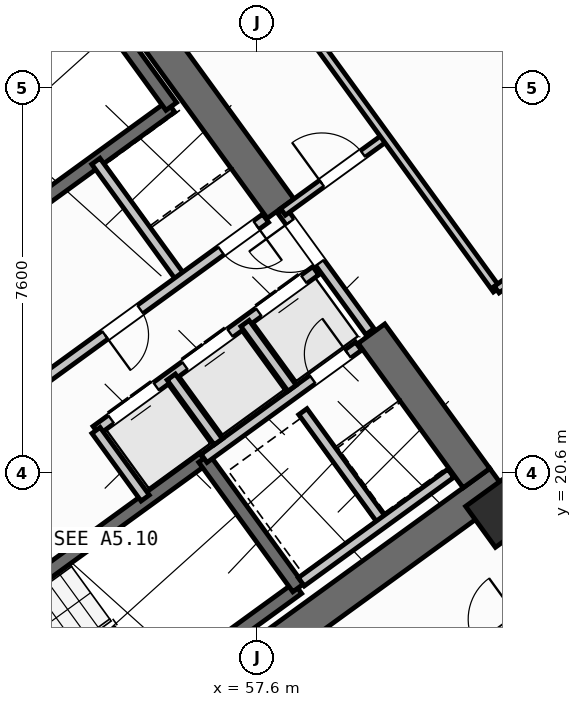
"""IFC4 building model, lengths in metres.
Left out: names, types, materials, properties, quantities, classifications, styles, units other than length and angle.
Written with IfcOpenShell. Run it as: python <this file> out.ifc"""

import sys

from ifc_helpers import new_model, si_unit, direction, frame, frame_2d, origin, origin_2d, place, context, subcontext, project, spatial, rectangle, hollow_rectangle, extrude, source, transform, mapped, element, fill, save


model = new_model("IFC4")
c1 = context("Model", 3, precision=1e-05, world=origin(), true_north=direction((0.0, 1.0)))
c2 = subcontext(c1, "Body", "Model", "MODEL_VIEW")
j1 = project(units=[si_unit("LENGTHUNIT", "METRE"), si_unit("PLANEANGLEUNIT", "RADIAN")], contexts=[c1])
p1 = place(None, origin())
s1 = spatial("IfcSite", under=j1, at=p1, CompositionType="ELEMENT")
p2 = place(p1, origin())
s2 = spatial("IfcBuilding", under=s1, at=p2, CompositionType="ELEMENT")
p3 = place(p2, frame((0.0, 0.0, 52.8)))
s3 = spatial("IfcBuildingStorey", under=s2, at=p3, CompositionType="ELEMENT", Elevation=52.8)
p4 = place(p3, frame((52.318, 13.11, 0.0), z_axis=(0.0, 0.0, 1.0), x_axis=(0.809019445368, 0.587781878776, 0.0)))
e1 = element("IfcWall", 1, at=p4, inside=s3, PredefinedType="SHEAR", context=c2, shape_type="SweptSolid", body=[
    extrude(rectangle(XDim=12.44, YDim=0.65, at=frame_2d((6.22, 0.0))), origin(), (0.0, 0.0, 1.0), 3.35),
])
p5 = place(p3, frame((44.325, 24.113, 0.0), z_axis=(0.0, 0.0, 1.0), x_axis=(0.809012664862, 0.58779121131, 0.0)))
e2 = element("IfcWall", 2, at=p5, inside=s3, PredefinedType="SHEAR", context=c2, shape_type="SweptSolid", body=[
    extrude(rectangle(XDim=12.44, YDim=0.65, at=frame_2d((6.22, 0.0))), origin(), (0.0, 0.0, 1.0), 3.35),
])
p6 = place(p3, frame((61.929, 20.494, 0.0), z_axis=(0.0, 0.0, 1.0), x_axis=(-0.58782982593, 0.808984607855, 0.0)))
e3 = element("IfcWall", 3, at=p6, inside=s3, PredefinedType="SHEAR", context=c2, shape_type="SweptSolid", body=[
    extrude(rectangle(XDim=3.525, YDim=0.65, at=frame_2d((1.762, 0.0))), origin(), (0.0, 0.0, 1.0), 3.35),
])
p7 = place(p3, frame((58.064, 25.813, 0.0), z_axis=(0.0, 0.0, 1.0), x_axis=(-0.58777996584, 0.809020835181, 0.0)))
e4 = element("IfcWall", 4, at=p7, inside=s3, PredefinedType="SHEAR", context=c2, shape_type="SweptSolid", body=[
    extrude(rectangle(XDim=6.375, YDim=0.65, at=frame_2d((3.188, 0.0))), origin(), (0.0, 0.0, 1.0), 3.35),
])
m1 = source(origin(), c2, "Body", "SweptSolid", [
    extrude(hollow_rectangle(XDim=1.0, YDim=1.0, WallThickness=0.04, at=origin_2d()), origin(), (0.0, 0.0, 1.0), 3.6),
])
for number, where, z_axis, x_axis in (
    (5, (62.414, 19.827, 0.0), (0.0, 0.0, 1.0), (0.809, 0.588, 0.0)),
    (6, (62.977, 29.259, 0.0), (0.0, 0.0, 1.0), (0.809, 0.588, 0.0)),
):
    element("IfcColumn", number, at=place(p3, frame(where, z_axis=z_axis, x_axis=x_axis)), inside=s3, PredefinedType="COLUMN", context=c2, shape_type="MappedRepresentation", body=[
        mapped(m1, transform((0.0, 0.0, 0.0), scale=1.0)),
    ])
p8 = place(p3, frame((43.938, 25.192, 0.0), z_axis=(0.0, 0.0, 1.0), x_axis=(0.809016324578, 0.587786174187, 0.0)))
e7 = element("IfcWall", 7, at=p8, inside=s3, PredefinedType="STANDARD", context=c2, shape_type="SweptSolid", body=[
    extrude(rectangle(XDim=17.587, YDim=0.32, at=frame_2d((8.794, 0.0))), origin(), (0.0, 0.0, 1.0), 3.35),
])
p9 = place(p8, frame((14.914, 0.0, 0.0)))
e8 = element("IfcOpeningElement", 8, at=p9, cuts=e7, PredefinedType="OPENING", context=c2, shape_type="SweptSolid", body=[
    extrude(rectangle(XDim=1.05, YDim=2.15, at=frame_2d((0.525, 1.075))), frame((0.0, 0.17, 0.0), z_axis=(0.0, -1.0, 0.0), x_axis=(1.0, 0.0, 0.0)), (0.0, 0.0, 1.0), 0.34),
])
p10 = place(p8, frame((2.169, 0.0, 0.8)))
e9 = element("IfcOpeningElement", 9, at=p10, cuts=e7, PredefinedType="OPENING", context=c2, shape_type="SweptSolid", body=[
    extrude(rectangle(XDim=2.1, YDim=1.55, at=frame_2d((1.05, 0.775))), frame((0.0, 0.17, 0.0), z_axis=(0.0, -1.0, 0.0), x_axis=(1.0, 0.0, 0.0)), (0.0, 0.0, 1.0), 0.34),
])
p11 = place(p8, frame((7.319, 0.0, 0.8)))
e10 = element("IfcOpeningElement", 10, at=p11, cuts=e7, PredefinedType="OPENING", context=c2, shape_type="SweptSolid", body=[
    extrude(rectangle(XDim=2.1, YDim=1.55, at=frame_2d((1.05, 0.775))), frame((0.0, 0.17, 0.0), z_axis=(0.0, -1.0, 0.0), x_axis=(1.0, 0.0, 0.0)), (0.0, 0.0, 1.0), 0.34),
])
p12 = place(p3, frame((58.455, 35.484, 0.0), z_axis=(0.0, 0.0, 1.0), x_axis=(0.587783625747, -0.809018176127, 0.0)))
e11 = element("IfcWall", 11, at=p12, inside=s3, PredefinedType="STANDARD", context=c2, shape_type="SweptSolid", body=[
    extrude(rectangle(XDim=21.587, YDim=0.32, at=frame_2d((10.794, 0.0))), origin(), (0.0, 0.0, 1.0), 2.725),
])
p13 = place(p12, frame((1.5, 0.0, 0.8)))
e12 = element("IfcOpeningElement", 12, at=p13, cuts=e11, PredefinedType="OPENING", context=c2, shape_type="SweptSolid", body=[
    extrude(rectangle(XDim=2.1, YDim=1.55, at=frame_2d((1.05, 0.775))), frame((0.0, 0.17, 0.0), z_axis=(0.0, -1.0, 0.0), x_axis=(1.0, 0.0, 0.0)), (0.0, 0.0, 1.0), 0.34),
])
p14 = place(p12, frame((5.105, 0.0, 0.85)))
e13 = element("IfcOpeningElement", 13, at=p14, cuts=e11, PredefinedType="OPENING", context=c2, shape_type="SweptSolid", body=[
    extrude(rectangle(XDim=1.5, YDim=1.5, at=frame_2d((0.75, 0.75))), frame((0.0, 0.17, 0.0), z_axis=(0.0, -1.0, 0.0), x_axis=(1.0, 0.0, 0.0)), (0.0, 0.0, 1.0), 0.34),
])
p15 = place(p12, frame((8.954, 0.0, 0.85)))
e14 = element("IfcOpeningElement", 14, at=p15, cuts=e11, PredefinedType="OPENING", context=c2, shape_type="SweptSolid", body=[
    extrude(rectangle(XDim=1.5, YDim=1.5, at=frame_2d((0.75, 0.75))), frame((0.0, 0.17, 0.0), z_axis=(0.0, -1.0, 0.0), x_axis=(1.0, 0.0, 0.0)), (0.0, 0.0, 1.0), 0.34),
])
p16 = place(p12, frame((17.581, 0.0, 0.95)))
e15 = element("IfcOpeningElement", 15, at=p16, cuts=e11, PredefinedType="OPENING", context=c2, shape_type="SweptSolid", body=[
    extrude(rectangle(XDim=1.2, YDim=1.4, at=frame_2d((0.6, 0.7))), frame((0.0, 0.17, 0.0), z_axis=(0.0, -1.0, 0.0), x_axis=(1.0, 0.0, 0.0)), (0.0, 0.0, 1.0), 0.34),
])
p17 = place(p3, frame((71.098, 17.731, 0.0), z_axis=(0.0, 0.0, 1.0), x_axis=(-0.809021120468, -0.587779573171, 0.0)))
e16 = element("IfcWall", 16, at=p17, inside=s3, PredefinedType="STANDARD", context=c2, shape_type="SweptSolid", body=[
    extrude(rectangle(XDim=17.588, YDim=0.32, at=frame_2d((8.794, 0.0))), origin(), (0.0, 0.0, 1.0), 3.35),
])
p18 = place(p17, frame((1.624, 0.0, 0.0)))
e17 = element("IfcOpeningElement", 17, at=p18, cuts=e16, PredefinedType="OPENING", context=c2, shape_type="SweptSolid", body=[
    extrude(rectangle(XDim=1.05, YDim=2.15, at=frame_2d((0.525, 1.075))), frame((0.0, 0.17, 0.0), z_axis=(0.0, -1.0, 0.0), x_axis=(1.0, 0.0, 0.0)), (0.0, 0.0, 1.0), 0.34),
])
p19 = place(p17, frame((4.104, 0.0, 1.0)))
e18 = element("IfcOpeningElement", 18, at=p19, cuts=e16, PredefinedType="OPENING", context=c2, shape_type="SweptSolid", body=[
    extrude(rectangle(XDim=0.9, YDim=1.25, at=frame_2d((0.45, 0.625))), frame((0.0, 0.17, 0.0), z_axis=(0.0, -1.0, 0.0), x_axis=(1.0, 0.0, 0.0)), (0.0, 0.0, 1.0), 0.34),
])
p20 = place(p17, frame((7.879, 0.0, 0.85)))
e19 = element("IfcOpeningElement", 19, at=p20, cuts=e16, PredefinedType="OPENING", context=c2, shape_type="SweptSolid", body=[
    extrude(rectangle(XDim=1.8, YDim=1.5, at=frame_2d((0.9, 0.75))), frame((0.0, 0.17, 0.0), z_axis=(0.0, -1.0, 0.0), x_axis=(1.0, 0.0, 0.0)), (0.0, 0.0, 1.0), 0.34),
])
p21 = place(p17, frame((12.849, 0.0, 0.85)))
e20 = element("IfcOpeningElement", 20, at=p21, cuts=e16, PredefinedType="OPENING", context=c2, shape_type="SweptSolid", body=[
    extrude(rectangle(XDim=1.8, YDim=1.5, at=frame_2d((0.9, 0.75))), frame((0.0, 0.17, 0.0), z_axis=(0.0, -1.0, 0.0), x_axis=(1.0, 0.0, 0.0)), (0.0, 0.0, 1.0), 0.34),
])
p22 = place(p3, frame((48.006, 25.996, 0.0), z_axis=(0.0, 0.0, 1.0), x_axis=(0.80901903764, 0.587782439969, 0.0)))
e21 = element("IfcWall", 21, at=p22, inside=s3, PredefinedType="SHEAR", context=c2, shape_type="SweptSolid", body=[
    extrude(rectangle(XDim=7.46, YDim=0.26, at=frame_2d((3.73, 0.0))), origin(), (0.0, 0.0, 1.0), 3.35),
])
p23 = place(p3, frame((49.863, 23.44, 0.0), z_axis=(0.0, 0.0, 1.0), x_axis=(0.809003474932, 0.587803859759, 0.0)))
e22 = element("IfcWall", 22, at=p23, inside=s3, PredefinedType="SHEAR", context=c2, shape_type="SweptSolid", body=[
    extrude(rectangle(XDim=7.46, YDim=0.26, at=frame_2d((3.73, 0.0))), origin(), (0.0, 0.0, 1.0), 3.35),
])
p24 = place(p23, frame((0.36, 0.0, 0.0)))
e23 = element("IfcOpeningElement", 23, at=p24, cuts=e22, PredefinedType="OPENING", context=c2, shape_type="SweptSolid", body=[
    extrude(rectangle(XDim=0.86, YDim=2.05, at=frame_2d((0.43, 1.025))), frame((0.0, 0.14, 0.0), z_axis=(0.0, -1.0, 0.0), x_axis=(1.0, 0.0, 0.0)), (0.0, 0.0, 1.0), 0.28),
])
p25 = place(p3, frame((55.906, 27.831, 0.0), z_axis=(0.0, 0.0, 1.0), x_axis=(-0.587804123638, 0.809003283204, 0.0)))
e24 = element("IfcWall", 24, at=p25, inside=s3, PredefinedType="SHEAR", context=c2, shape_type="SweptSolid", body=[
    extrude(rectangle(XDim=3.16, YDim=0.26, at=frame_2d((1.58, 0.0))), origin(), (0.0, 0.0, 1.0), 3.35),
])
p26 = place(p3, frame((52.472, 14.013, 0.0), z_axis=(0.0, 0.0, 1.0), x_axis=(0.809028366311, 0.587769599847, 0.0)))
e25 = element("IfcWall", 25, at=p26, inside=s3, PredefinedType="SHEAR", context=c2, shape_type="SweptSolid", body=[
    extrude(rectangle(XDim=7.33, YDim=0.26, at=frame_2d((3.665, 0.0))), origin(), (0.0, 0.0, 1.0), 3.35),
])
p27 = place(p3, frame((50.615, 16.57, 0.0), z_axis=(0.0, 0.0, 1.0), x_axis=(0.809028366311, 0.587769599847, 0.0)))
e26 = element("IfcWall", 26, at=p27, inside=s3, PredefinedType="SHEAR", context=c2, shape_type="SweptSolid", body=[
    extrude(rectangle(XDim=7.33, YDim=0.26, at=frame_2d((3.665, 0.0))), origin(), (0.0, 0.0, 1.0), 3.35),
])
p28 = place(p27, frame((0.22, 0.0, 0.0)))
e27 = element("IfcOpeningElement", 27, at=p28, cuts=e26, PredefinedType="OPENING", context=c2, shape_type="SweptSolid", body=[
    extrude(rectangle(XDim=1.1, YDim=2.1, at=frame_2d((0.55, 1.05))), frame((0.0, 0.14, 0.0), z_axis=(0.0, -1.0, 0.0), x_axis=(1.0, 0.0, 0.0)), (0.0, 0.0, 1.0), 0.28),
])
p29 = place(p3, frame((58.41, 18.327, 0.0), z_axis=(0.0, 0.0, 1.0), x_axis=(-0.58776738483, 0.809029975545, 0.0)))
e28 = element("IfcWall", 28, at=p29, inside=s3, PredefinedType="SHEAR", context=c2, shape_type="SweptSolid", body=[
    extrude(rectangle(XDim=3.16, YDim=0.26, at=frame_2d((1.58, 0.0))), origin(), (0.0, 0.0, 1.0), 3.35),
])
p30 = place(p3, frame((56.553, 20.884, 0.0), z_axis=(0.0, 0.0, 1.0), x_axis=(0.809035789462, 0.587759382205, 0.0)))
e29 = element("IfcWall", 29, at=p30, inside=s3, PredefinedType="STANDARD", context=c2, shape_type="SweptSolid", body=[
    extrude(rectangle(XDim=3.768, YDim=0.2, at=frame_2d((1.884, 0.0))), origin(), (0.0, 0.0, 1.0), 3.34),
])
p31 = place(p30, frame((2.65, 0.0, 0.0)))
e30 = element("IfcOpeningElement", 30, at=p31, cuts=e29, PredefinedType="OPENING", context=c2, shape_type="SweptSolid", body=[
    extrude(rectangle(XDim=0.86, YDim=2.05, at=frame_2d((0.43, 1.025))), frame((0.0, 0.11, 0.0), z_axis=(0.0, -1.0, 0.0), x_axis=(1.0, 0.0, 0.0)), (0.0, 0.0, 1.0), 0.22),
])
p32 = place(p3, frame((54.421, 21.436, 0.0), z_axis=(0.0, 0.0, 1.0), x_axis=(0.809013710463, 0.587789772183, 0.0)))
e31 = element("IfcWall", 31, at=p32, inside=s3, PredefinedType="STANDARD", context=c2, shape_type="SweptSolid", body=[
    extrude(rectangle(XDim=5.36, YDim=0.2, at=frame_2d((2.68, 0.0))), origin(), (0.0, 0.0, 1.0), 3.34),
])
p33 = place(p32, frame((0.37, 0.0, 0.0)))
e32 = element("IfcOpeningElement", 32, at=p33, cuts=e31, PredefinedType="OPENING", context=c2, shape_type="SweptSolid", body=[
    extrude(rectangle(XDim=1.1, YDim=2.15, at=frame_2d((0.55, 1.075))), frame((0.0, 0.11, 0.0), z_axis=(0.0, -1.0, 0.0), x_axis=(1.0, 0.0, 0.0)), (0.0, 0.0, 1.0), 0.22),
])
p34 = place(p32, frame((2.17, 0.0, 0.0)))
e33 = element("IfcOpeningElement", 33, at=p34, cuts=e31, PredefinedType="OPENING", context=c2, shape_type="SweptSolid", body=[
    extrude(rectangle(XDim=1.1, YDim=2.15, at=frame_2d((0.55, 1.075))), frame((0.0, 0.11, 0.0), z_axis=(0.0, -1.0, 0.0), x_axis=(1.0, 0.0, 0.0)), (0.0, 0.0, 1.0), 0.22),
])
p35 = place(p32, frame((3.97, 0.0, 0.0)))
e34 = element("IfcOpeningElement", 34, at=p35, cuts=e31, PredefinedType="OPENING", context=c2, shape_type="SweptSolid", body=[
    extrude(rectangle(XDim=1.1, YDim=2.15, at=frame_2d((0.55, 1.075))), frame((0.0, 0.11, 0.0), z_axis=(0.0, -1.0, 0.0), x_axis=(1.0, 0.0, 0.0)), (0.0, 0.0, 1.0), 0.22),
])
p36 = place(p3, frame((55.391, 20.102, 0.0), z_axis=(0.0, 0.0, 1.0), x_axis=(-0.58778447739, 0.809017557374, 0.0)))
e35 = element("IfcWall", 35, at=p36, inside=s3, PredefinedType="STANDARD", context=c2, shape_type="SweptSolid", body=[
    extrude(rectangle(XDim=1.65, YDim=0.2, at=frame_2d((0.825, 0.0))), origin(), (0.0, 0.0, 1.0), 3.34),
])
p37 = place(p3, frame((56.834, 21.212, 0.0), z_axis=(0.0, 0.0, 1.0), x_axis=(-0.58776738483, 0.809029975545, 0.0)))
e36 = element("IfcWall", 36, at=p37, inside=s3, PredefinedType="STANDARD", context=c2, shape_type="SweptSolid", body=[
    extrude(rectangle(XDim=1.58, YDim=0.2, at=frame_2d((0.79, 0.0))), origin(), (0.0, 0.0, 1.0), 3.34),
])
p38 = place(p3, frame((58.29, 22.27, 0.0), z_axis=(0.0, 0.0, 1.0), x_axis=(-0.587840865826, 0.808976585857, 0.0)))
e37 = element("IfcWall", 37, at=p38, inside=s3, PredefinedType="STANDARD", context=c2, shape_type="SweptSolid", body=[
    extrude(rectangle(XDim=1.58, YDim=0.2, at=frame_2d((0.79, 0.0))), origin(), (0.0, 0.0, 1.0), 3.34),
])
p39 = place(p3, frame((60.067, 19.655, 0.0), z_axis=(0.0, 0.0, 1.0), x_axis=(-0.587800520745, 0.809005900975, 0.0)))
e38 = element("IfcWall", 38, at=p39, inside=s3, PredefinedType="STANDARD", context=c2, shape_type="SweptSolid", body=[
    extrude(rectangle(XDim=2.66, YDim=0.2, at=frame_2d((1.33, 0.0))), origin(), (0.0, 0.0, 1.0), 3.34),
])
p40 = place(p3, frame((58.472, 18.447, 0.0), z_axis=(0.0, 0.0, 1.0), x_axis=(0.809022487728, 0.587777691266, 0.0)))
e39 = element("IfcWall", 39, at=p40, inside=s3, PredefinedType="STANDARD", context=c2, shape_type="SweptSolid", body=[
    extrude(rectangle(XDim=3.648, YDim=0.2, at=frame_2d((1.824, 0.0))), origin(), (0.0, 0.0, 1.0), 3.34),
])
p41 = place(p3, frame((56.111, 24.419, 0.0), z_axis=(0.0, 0.0, 1.0), x_axis=(-0.58777848983, 0.809021907548, 0.0)))
e40 = element("IfcWall", 40, at=p41, inside=s3, PredefinedType="STANDARD", context=c2, shape_type="SweptSolid", body=[
    extrude(rectangle(XDim=2.88, YDim=0.2, at=frame_2d((1.44, 0.0))), origin(), (0.0, 0.0, 1.0), 3.34),
])
p42 = place(p3, frame((53.425, 22.468, 0.0), z_axis=(0.0, 0.0, 1.0), x_axis=(0.80902705128, 0.587771409902, 0.0)))
e41 = element("IfcWall", 41, at=p42, inside=s3, PredefinedType="STANDARD", context=c2, shape_type="SweptSolid", body=[
    extrude(rectangle(XDim=5.368, YDim=0.2, at=frame_2d((2.684, 0.0))), origin(), (0.0, 0.0, 1.0), 3.34),
])
p43 = place(p42, frame((4.28, 0.0, 0.0)))
e42 = element("IfcOpeningElement", 42, at=p43, cuts=e41, PredefinedType="OPENING", context=c2, shape_type="SweptSolid", body=[
    extrude(rectangle(XDim=0.86, YDim=2.05, at=frame_2d((0.43, 1.025))), frame((0.0, 0.11, 0.0), z_axis=(0.0, -1.0, 0.0), x_axis=(1.0, 0.0, 0.0)), (0.0, 0.0, 1.0), 0.22),
])
p44 = place(p42, frame((1.45, 0.0, 0.0)))
e43 = element("IfcOpeningElement", 43, at=p44, cuts=e41, PredefinedType="OPENING", context=c2, shape_type="SweptSolid", body=[
    extrude(rectangle(XDim=0.86, YDim=2.05, at=frame_2d((0.43, 1.025))), frame((0.0, 0.11, 0.0), z_axis=(0.0, -1.0, 0.0), x_axis=(1.0, 0.0, 0.0)), (0.0, 0.0, 1.0), 0.22),
])
p45 = place(p3, frame((59.827, 23.386, 0.0), z_axis=(0.0, 0.0, 1.0), x_axis=(-0.587803840107, 0.809003489211, 0.0)))
e44 = element("IfcWall", 44, at=p45, inside=s3, PredefinedType="STANDARD", context=c2, shape_type="SweptSolid", body=[
    extrude(rectangle(XDim=2.96, YDim=0.2, at=frame_2d((1.48, 0.0))), origin(), (0.0, 0.0, 1.0), 3.34),
])
p46 = place(p45, frame((1.68, 0.0, 0.0)))
e45 = element("IfcOpeningElement", 45, at=p46, cuts=e44, PredefinedType="OPENING", context=c2, shape_type="SweptSolid", body=[
    extrude(rectangle(XDim=1.0, YDim=2.1, at=frame_2d((0.5, 1.05))), frame((0.0, 0.11, 0.0), z_axis=(0.0, -1.0, 0.0), x_axis=(1.0, 0.0, 0.0)), (0.0, 0.0, 1.0), 0.22),
])
p47 = place(p3, frame((58.111, 25.749, 0.0), z_axis=(0.0, 0.0, 1.0), x_axis=(0.809000999347, 0.58780726693, 0.0)))
e46 = element("IfcWall", 46, at=p47, inside=s3, PredefinedType="PARTITIONING", context=c2, shape_type="SweptSolid", body=[
    extrude(rectangle(XDim=2.51, YDim=0.16, at=frame_2d((1.255, 0.0))), origin(), (0.0, 0.0, 1.0), 2.725),
])
p48 = place(p47, frame((0.95, 0.0, 0.0)))
e47 = element("IfcOpeningElement", 47, at=p48, cuts=e46, PredefinedType="OPENING", context=c2, shape_type="SweptSolid", body=[
    extrude(rectangle(XDim=1.0, YDim=2.1, at=frame_2d((0.5, 1.05))), frame((0.0, 0.09, 0.0), z_axis=(0.0, -1.0, 0.0), x_axis=(1.0, 0.0, 0.0)), (0.0, 0.0, 1.0), 0.18),
])
p49 = place(p3, frame((62.328, 24.215, 0.0), z_axis=(0.0, 0.0, 1.0), x_axis=(-0.587778600963, 0.809021826807, 0.0)))
e48 = element("IfcWall", 48, at=p49, inside=s3, PredefinedType="PARTITIONING", context=c2, shape_type="SweptSolid", body=[
    extrude(rectangle(XDim=11.45, YDim=0.16, at=frame_2d((5.725, 0.0))), origin(), (0.0, 0.0, 1.0), 3.34),
])
p50 = place(p3, frame((62.328, 24.215, 0.0), z_axis=(0.0, 0.0, 1.0), x_axis=(0.809003564202, 0.587803736896, 0.0)))
e49 = element("IfcWall", 49, at=p50, inside=s3, PredefinedType="PARTITIONING", context=c2, shape_type="SweptSolid", body=[
    extrude(rectangle(XDim=3.63, YDim=0.16, at=frame_2d((1.815, 0.0))), origin(), (0.0, 0.0, 1.0), 3.34),
])
p51 = place(p50, frame((1.305, 0.0, 0.0)))
e50 = element("IfcOpeningElement", 50, at=p51, cuts=e49, PredefinedType="OPENING", context=c2, shape_type="SweptSolid", body=[
    extrude(rectangle(XDim=1.0, YDim=2.1, at=frame_2d((0.5, 1.05))), frame((0.0, 0.09, 0.0), z_axis=(0.0, -1.0, 0.0), x_axis=(1.0, 0.0, 0.0)), (0.0, 0.0, 1.0), 0.18),
])
p52 = place(p3, frame((53.705, 11.126, 0.0), z_axis=(0.0, 0.0, 1.0), x_axis=(0.809014504436, 0.587788679384, 0.0)))
e51 = element("IfcWall", 51, at=p52, inside=s3, PredefinedType="PARTITIONING", context=c2, shape_type="SweptSolid", body=[
    extrude(rectangle(XDim=14.67, YDim=0.16, at=frame_2d((7.335, 0.0))), origin(), (0.0, 0.0, 1.0), 3.34),
])
p53 = place(p52, frame((10.2, 0.0, 0.0)))
e52 = element("IfcOpeningElement", 52, at=p53, cuts=e51, PredefinedType="OPENING", context=c2, shape_type="SweptSolid", body=[
    extrude(rectangle(XDim=1.0, YDim=2.1, at=frame_2d((0.5, 1.05))), frame((0.0, 0.09, 0.0), z_axis=(0.0, -1.0, 0.0), x_axis=(1.0, 0.0, 0.0)), (0.0, 0.0, 1.0), 0.18),
])
p54 = place(p3, frame((56.249, 9.785, 0.0), z_axis=(0.0, 0.0, 1.0), x_axis=(0.809011747655, 0.587792473715, 0.0)))
e53 = element("IfcWall", 53, at=p54, inside=s3, PredefinedType="PLUMBINGWALL", context=c2, shape_type="SweptSolid", body=[
    extrude(rectangle(XDim=13.4, YDim=0.14, at=frame_2d((6.7, 0.0))), origin(), (0.0, 0.0, 1.0), 3.34),
])
p55 = place(p54, frame((8.94, 0.0, 0.0)))
e54 = element("IfcOpeningElement", 54, at=p55, cuts=e53, PredefinedType="OPENING", context=c2, shape_type="SweptSolid", body=[
    extrude(rectangle(XDim=0.92, YDim=2.08, at=frame_2d((0.46, 1.04))), frame((0.0, 0.08, 0.0), z_axis=(0.0, -1.0, 0.0), x_axis=(1.0, 0.0, 0.0)), (0.0, 0.0, 1.0), 0.16),
])
m2 = source(origin(), c2, "Body", "SweptSolid", [
    extrude(rectangle(XDim=1.1, YDim=2.15, at=frame_2d((0.55, 1.075))), frame((0.0, 0.025, 0.0), z_axis=(0.0, -1.0, 0.0), x_axis=(1.0, 0.0, 0.0)), (0.0, 0.0, 1.0), 0.05),
])
p56 = place(p33, origin())
e55 = element("IfcDoor", 55, at=p56, inside=s3, OperationType="DOUBLE_DOOR_SLIDING", PredefinedType="DOOR", context=c2, shape_type="MappedRepresentation", body=[
    mapped(m2, transform((0.0, 0.0, 0.0), scale=1.0)),
])
fill(e32, e55)
p57 = place(p34, origin())
e56 = element("IfcDoor", 56, at=p57, inside=s3, OperationType="DOUBLE_DOOR_SLIDING", PredefinedType="DOOR", context=c2, shape_type="MappedRepresentation", body=[
    mapped(m2, transform((0.0, 0.0, 0.0), scale=1.0)),
])
fill(e33, e56)
p58 = place(p35, origin())
e57 = element("IfcDoor", 57, at=p58, inside=s3, OperationType="DOUBLE_DOOR_SLIDING", PredefinedType="DOOR", context=c2, shape_type="MappedRepresentation", body=[
    mapped(m2, transform((0.0, 0.0, 0.0), scale=1.0)),
])
fill(e34, e57)
m3 = source(origin(), c2, "Body", "SweptSolid", [
    extrude(rectangle(XDim=0.86, YDim=2.05, at=frame_2d((0.43, 1.025))), frame((0.0, 0.025, 0.0), z_axis=(0.0, -1.0, 0.0), x_axis=(1.0, 0.0, 0.0)), (0.0, 0.0, 1.0), 0.05),
])
p59 = place(p31, origin())
e58 = element("IfcDoor", 58, at=p59, inside=s3, OperationType="SINGLE_SWING_RIGHT", PredefinedType="DOOR", context=c2, shape_type="MappedRepresentation", body=[
    mapped(m3, transform((0.0, 0.0, 0.0), scale=1.0)),
])
fill(e30, e58)
p60 = place(p43, frame((0.86, 0.0, 0.0), z_axis=(0.0, 0.0, 1.0), x_axis=(-1.0, 0.0, 0.0)))
e59 = element("IfcDoor", 59, at=p60, inside=s3, OperationType="SINGLE_SWING_LEFT", PredefinedType="DOOR", context=c2, shape_type="MappedRepresentation", body=[
    mapped(m3, transform((0.0, 0.0, 0.0), scale=1.0)),
])
fill(e42, e59)
p61 = place(p44, frame((0.86, 0.0, 0.0), z_axis=(0.0, 0.0, 1.0), x_axis=(-1.0, 0.0, 0.0)))
e60 = element("IfcDoor", 60, at=p61, inside=s3, OperationType="SINGLE_SWING_RIGHT", PredefinedType="DOOR", context=c2, shape_type="MappedRepresentation", body=[
    mapped(m3, transform((0.0, 0.0, 0.0), scale=1.0)),
])
fill(e43, e60)
m4 = source(origin(), c2, "Body", "SweptSolid", [
    extrude(rectangle(XDim=1.0, YDim=2.1, at=frame_2d((0.5, 1.05))), frame((0.0, 0.025, 0.0), z_axis=(0.0, -1.0, 0.0), x_axis=(1.0, 0.0, 0.0)), (0.0, 0.0, 1.0), 0.05),
])
p62 = place(p48, origin())
e61 = element("IfcDoor", 61, at=p62, inside=s3, OperationType="SINGLE_SWING_LEFT", PredefinedType="DOOR", context=c2, shape_type="MappedRepresentation", body=[
    mapped(m4, transform((0.0, 0.0, 0.0), scale=1.0)),
])
fill(e47, e61)
p63 = place(p46, origin())
e62 = element("IfcDoor", 62, at=p63, inside=s3, OperationType="SINGLE_SWING_RIGHT", PredefinedType="DOOR", context=c2, shape_type="MappedRepresentation", body=[
    mapped(m4, transform((0.0, 0.0, 0.0), scale=1.0)),
])
fill(e45, e62)
p64 = place(p53, origin())
e63 = element("IfcDoor", 63, at=p64, inside=s3, OperationType="SINGLE_SWING_RIGHT", PredefinedType="DOOR", context=c2, shape_type="MappedRepresentation", body=[
    mapped(m4, transform((0.0, 0.0, 0.0), scale=1.0)),
])
fill(e52, e63)
save(model, sys.argv[1])
